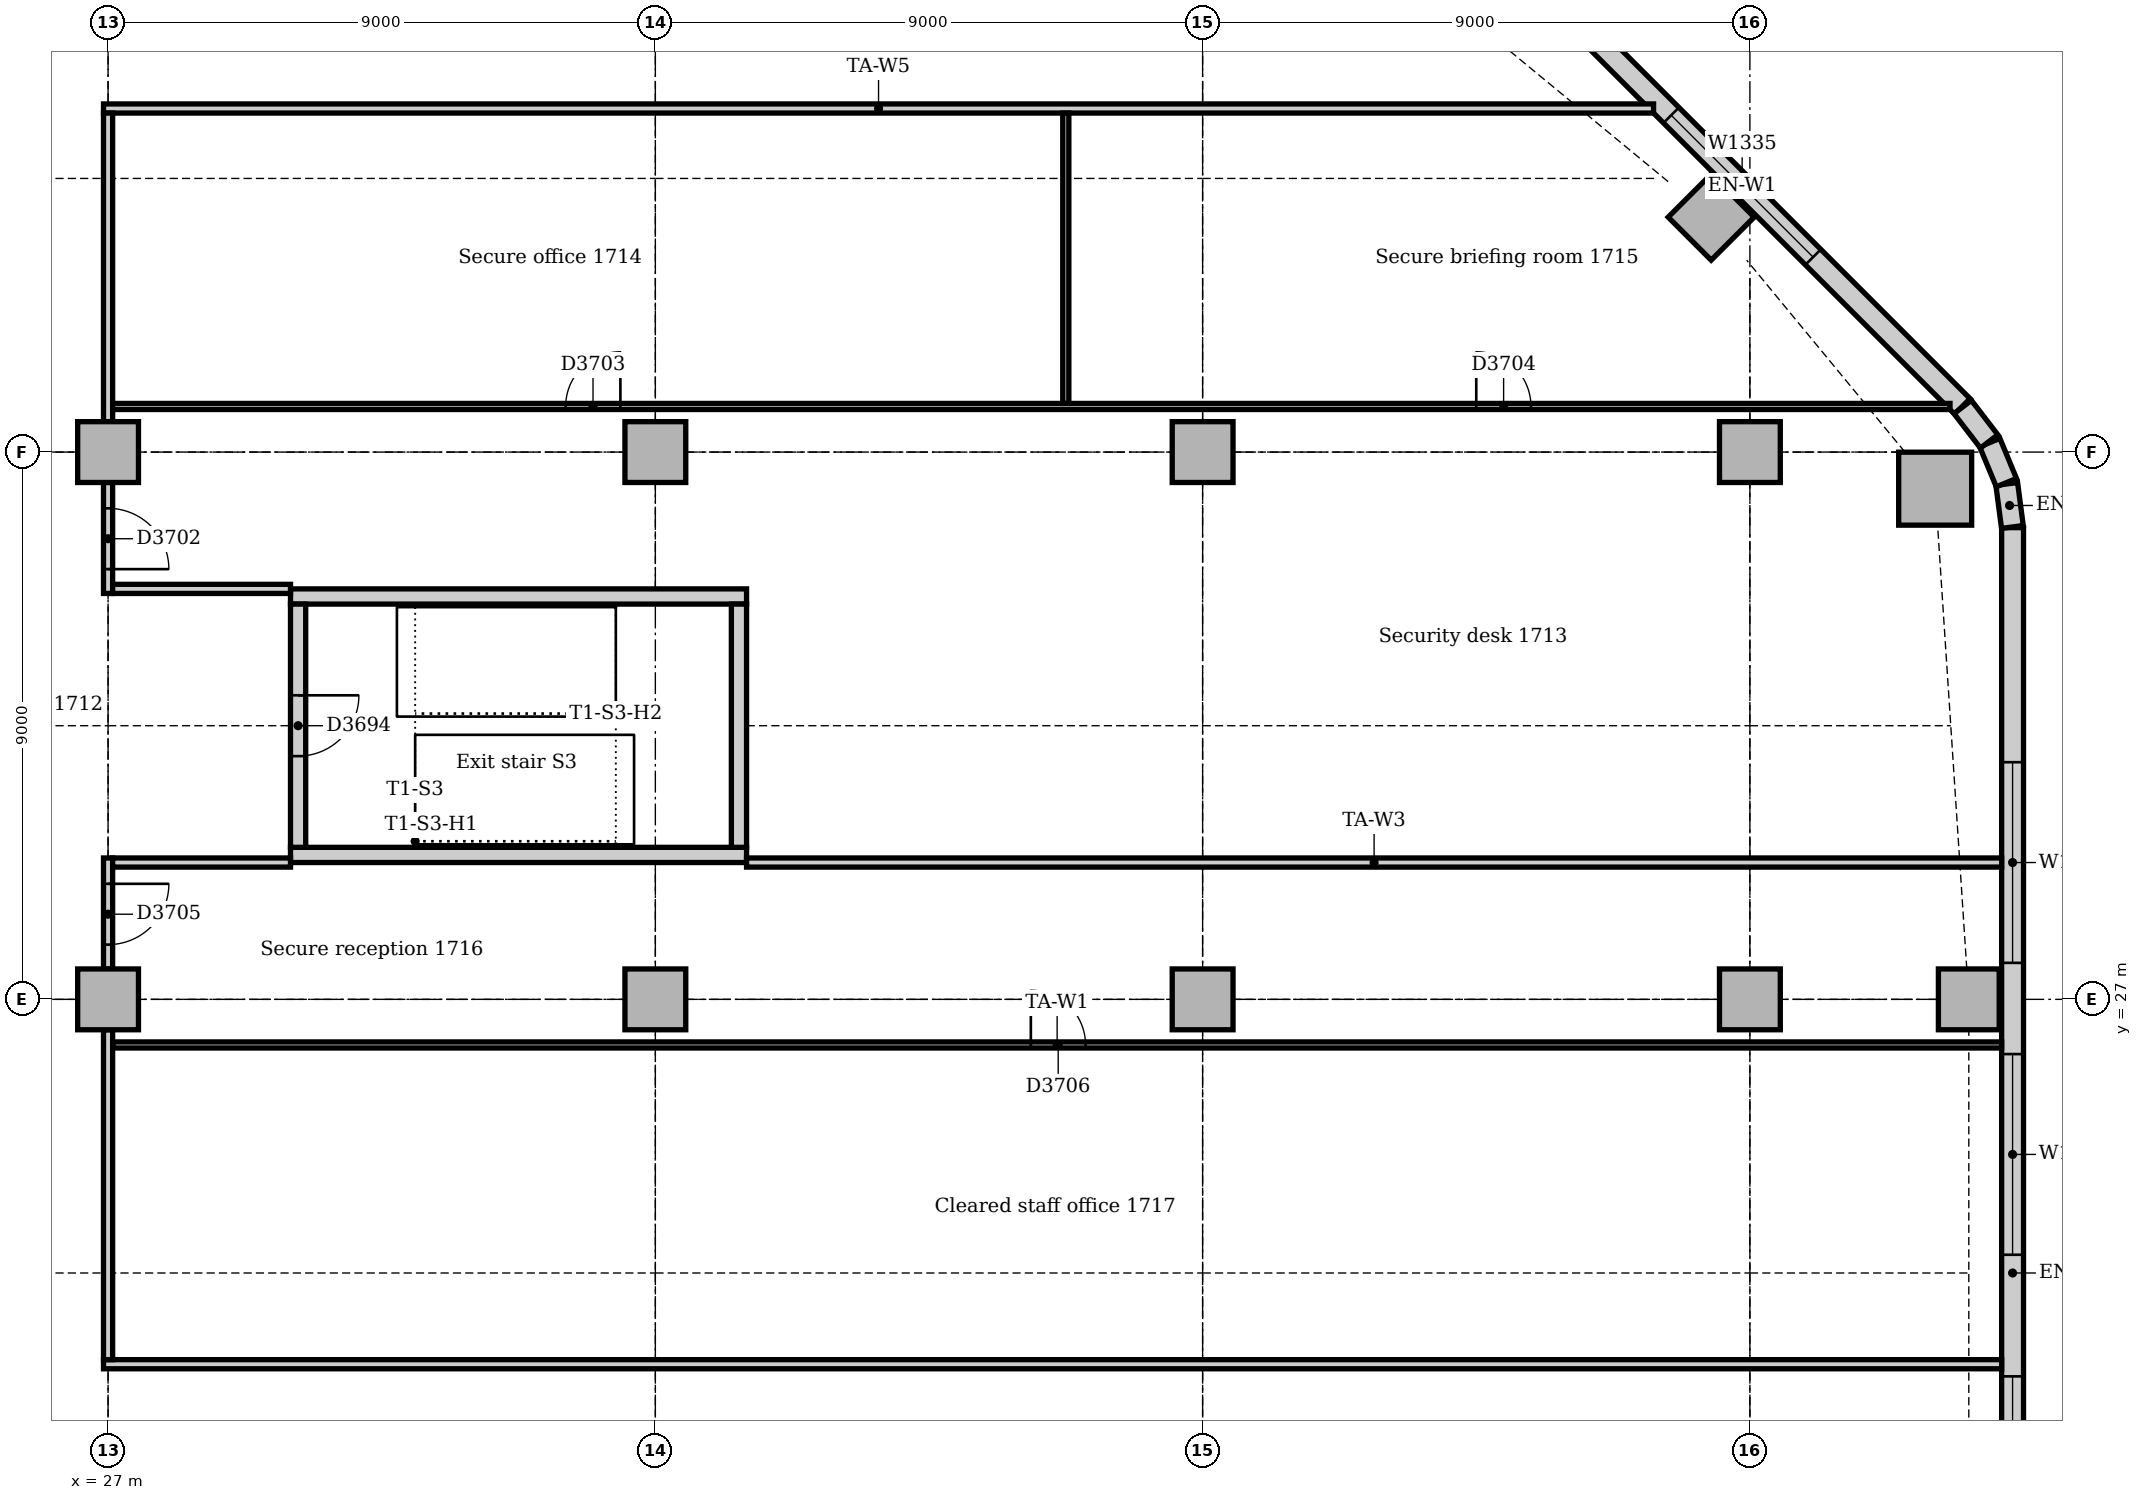
"""IFC4 building model, lengths in metres.
Left out: names, types, materials, properties, quantities, classifications, styles, units other than length and angle.
Written with IfcOpenShell. Run it as: python <this file> out.ifc"""

import sys

from ifc_helpers import new_model, si_unit, direction, frame, frame_2d, origin, origin_2d, place, context, subcontext, project, spatial, rectangle, extrude, element, fill, save


model = new_model("IFC4")
c1 = context("Model", 3, precision=1e-05, world=origin(), true_north=direction((0.0, 1.0)))
c2 = subcontext(c1, "Body", "Model", "MODEL_VIEW")
j1 = project(units=[si_unit("LENGTHUNIT", "METRE"), si_unit("PLANEANGLEUNIT", "RADIAN")], contexts=[c1])
p1 = place(None, origin())
s1 = spatial("IfcSite", under=j1, at=p1, CompositionType="ELEMENT")
p2 = place(p1, origin())
s2 = spatial("IfcBuilding", under=s1, at=p2, CompositionType="ELEMENT")
p3 = place(p2, frame((0.0, 0.0, 75.0)))
s3 = spatial("IfcBuildingStorey", under=s2, at=p3, CompositionType="ELEMENT", Elevation=75.0)
for number, where, z_axis, x_axis in (
    (1, (30.0, 29.375, 0.0), (0.0, 0.0, 1.0), (1.0, 0.0, 0.0)),
    (2, (37.5, 33.625, 0.0), (0.0, 0.0, 1.0), (-1.0, 0.0, 0.0)),
):
    element("IfcWall", number, at=place(p3, frame(where, z_axis=z_axis, x_axis=x_axis)), inside=s3, PredefinedType="SOLIDWALL", context=c2, shape_type="SweptSolid", body=[
        extrude(rectangle(XDim=7.5, YDim=0.25, at=frame_2d((3.75, 0.0))), origin(), (0.0, 0.0, 1.0), 4.0),
    ])
p4 = place(p3, frame((37.375, 29.5, 0.0), z_axis=(0.0, 0.0, 1.0), x_axis=(0.0, 1.0, 0.0)))
e3 = element("IfcWall", 3, at=p4, inside=s3, PredefinedType="SOLIDWALL", context=c2, shape_type="SweptSolid", body=[
    extrude(rectangle(XDim=4.0, YDim=0.25, at=frame_2d((2.0, 0.0))), origin(), (0.0, 0.0, 1.0), 4.0),
])
p5 = place(p3, frame((30.125, 33.5, 0.0), z_axis=(0.0, 0.0, 1.0), x_axis=(0.0, -1.0, 0.0)))
e4 = element("IfcWall", 4, at=p5, inside=s3, PredefinedType="SOLIDWALL", context=c2, shape_type="SweptSolid", body=[
    extrude(rectangle(XDim=4.0, YDim=0.25, at=frame_2d((2.0, 0.0))), origin(), (0.0, 0.0, 1.0), 4.0),
])
p6 = place(p5, frame((1.5, 0.0, 0.0)))
e5 = element("IfcOpeningElement", 5, at=p6, cuts=e4, PredefinedType="OPENING", context=c2, shape_type="SweptSolid", body=[
    extrude(rectangle(XDim=1.0, YDim=2.1, at=frame_2d((0.5, 1.05))), frame((0.0, 0.135, 0.0), z_axis=(0.0, -1.0, 0.0), x_axis=(1.0, 0.0, 0.0)), (0.0, 0.0, 1.0), 0.27),
])
p7 = place(p3, frame((57.047, 35.398, 0.0), z_axis=(0.0, 0.0, 1.0), x_axis=(1.0, 0.0, 0.0)))
e6 = element("IfcColumn", 6, at=p7, inside=s3, PredefinedType="COLUMN", context=c2, shape_type="SweptSolid", body=[
    extrude(rectangle(XDim=1.2, YDim=1.2, at=origin_2d()), origin(), (0.0, 0.0, 1.0), 3.85),
])
for number, where, z_axis, x_axis in (
    (7, (57.6, 27.0, 0.0), (0.0, 0.0, 1.0), (1.0, 0.0, 0.0)),
    (8, (53.364, 39.864, 0.0), (0.0, 0.0, 1.0), (0.707, 0.707, 0.0)),
    (9, (27.0, 27.0, 0.0), (0.0, 0.0, 1.0), (1.0, 0.0, 0.0)),
    (10, (27.0, 36.0, 0.0), (0.0, 0.0, 1.0), (1.0, 0.0, 0.0)),
    (11, (36.0, 27.0, 0.0), (0.0, 0.0, 1.0), (1.0, 0.0, 0.0)),
    (12, (36.0, 36.0, 0.0), (0.0, 0.0, 1.0), (1.0, 0.0, 0.0)),
    (13, (45.0, 27.0, 0.0), (0.0, 0.0, 1.0), (1.0, 0.0, 0.0)),
    (14, (45.0, 36.0, 0.0), (0.0, 0.0, 1.0), (1.0, 0.0, 0.0)),
    (15, (54.0, 27.0, 0.0), (0.0, 0.0, 1.0), (1.0, 0.0, 0.0)),
    (16, (54.0, 36.0, 0.0), (0.0, 0.0, 1.0), (1.0, 0.0, 0.0)),
):
    element("IfcColumn", number, at=place(p3, frame(where, z_axis=z_axis, x_axis=x_axis)), inside=s3, PredefinedType="COLUMN", context=c2, shape_type="SweptSolid", body=[
        extrude(rectangle(XDim=1.0, YDim=1.0, at=origin_2d()), origin(), (0.0, 0.0, 1.0), 3.85),
    ])
p8 = place(p3, frame((58.32, 10.243, 0.0), z_axis=(0.0, 0.0, 1.0), x_axis=(0.0, 1.0, 0.0)))
e17 = element("IfcWall", 17, at=p8, inside=s3, PredefinedType="STANDARD", context=c2, shape_type="SweptSolid", body=[
    extrude(rectangle(XDim=24.515, YDim=0.36, at=frame_2d((12.257, 0.0))), origin(), (0.0, 0.0, 1.0), 3.85),
])
p9 = place(p8, frame((3.857, 0.0, 0.9)))
e18 = element("IfcOpeningElement", 18, at=p9, cuts=e17, PredefinedType="OPENING", context=c2, shape_type="SweptSolid", body=[
    extrude(rectangle(XDim=3.3, YDim=1.6, at=frame_2d((1.65, 0.8))), frame((0.0, 0.19, 0.0), z_axis=(0.0, -1.0, 0.0), x_axis=(1.0, 0.0, 0.0)), (0.0, 0.0, 1.0), 0.38),
])
p10 = place(p8, frame((8.757, 0.0, 0.9)))
e19 = element("IfcOpeningElement", 19, at=p10, cuts=e17, PredefinedType="OPENING", context=c2, shape_type="SweptSolid", body=[
    extrude(rectangle(XDim=1.8, YDim=1.6, at=frame_2d((0.9, 0.8))), frame((0.0, 0.19, 0.0), z_axis=(0.0, -1.0, 0.0), x_axis=(1.0, 0.0, 0.0)), (0.0, 0.0, 1.0), 0.38),
])
p11 = place(p8, frame((12.557, 0.0, 0.9)))
e20 = element("IfcOpeningElement", 20, at=p11, cuts=e17, PredefinedType="OPENING", context=c2, shape_type="SweptSolid", body=[
    extrude(rectangle(XDim=3.3, YDim=1.6, at=frame_2d((1.65, 0.8))), frame((0.0, 0.19, 0.0), z_axis=(0.0, -1.0, 0.0), x_axis=(1.0, 0.0, 0.0)), (0.0, 0.0, 1.0), 0.38),
])
p12 = place(p8, frame((17.357, 0.0, 0.9)))
e21 = element("IfcOpeningElement", 21, at=p12, cuts=e17, PredefinedType="OPENING", context=c2, shape_type="SweptSolid", body=[
    extrude(rectangle(XDim=3.3, YDim=1.6, at=frame_2d((1.65, 0.8))), frame((0.0, 0.19, 0.0), z_axis=(0.0, -1.0, 0.0), x_axis=(1.0, 0.0, 0.0)), (0.0, 0.0, 1.0), 0.38),
])
p13 = place(p3, frame((57.494, 36.751, 0.0), z_axis=(0.0, 0.0, 1.0), x_axis=(-0.707106781187, 0.707106781187, 0.0)))
e22 = element("IfcWall", 22, at=p13, inside=s3, PredefinedType="STANDARD", context=c2, shape_type="SweptSolid", body=[
    extrude(rectangle(XDim=10.243, YDim=0.36, at=frame_2d((5.121, 0.0))), origin(), (0.0, 0.0, 1.0), 3.85),
])
p14 = place(p13, frame((3.471, 0.0, 0.9)))
e23 = element("IfcOpeningElement", 23, at=p14, cuts=e22, PredefinedType="OPENING", context=c2, shape_type="SweptSolid", body=[
    extrude(rectangle(XDim=3.3, YDim=1.6, at=frame_2d((1.65, 0.8))), frame((0.0, 0.19, 0.0), z_axis=(0.0, -1.0, 0.0), x_axis=(1.0, 0.0, 0.0)), (0.0, 0.0, 1.0), 0.38),
])
for number, where, z_axis, x_axis in (
    (24, (58.317, 34.769, 0.0), (0.0, 0.0, 1.0), (-0.131, 0.991, 0.0)),
    (25, (58.218, 35.497, 0.0), (0.0, 0.0, 1.0), (-0.383, 0.924, 0.0)),
):
    element("IfcWall", number, at=place(p3, frame(where, z_axis=z_axis, x_axis=x_axis)), inside=s3, PredefinedType="STANDARD", context=c2, shape_type="SweptSolid", body=[
        extrude(rectangle(XDim=0.713, YDim=0.36, at=frame_2d((0.356, 0.0))), origin(), (0.0, 0.0, 1.0), 3.85),
    ])
p15 = place(p3, frame((57.934, 36.175, 0.0), z_axis=(0.0, 0.0, 1.0), x_axis=(-0.608802368033, 0.793321924995, 0.0)))
e26 = element("IfcWall", 26, at=p15, inside=s3, PredefinedType="STANDARD", context=c2, shape_type="SweptSolid", body=[
    extrude(rectangle(XDim=0.713, YDim=0.36, at=frame_2d((0.357, 0.0))), origin(), (0.0, 0.0, 1.0), 3.85),
])
p16 = place(p3, frame((26.925, 21.0, 0.0), z_axis=(0.0, 0.0, 1.0), x_axis=(1.0, 0.0, 0.0)))
e27 = element("IfcWall", 27, at=p16, inside=s3, PredefinedType="PARTITIONING", context=c2, shape_type="SweptSolid", body=[
    extrude(rectangle(XDim=31.215, YDim=0.15, at=frame_2d((15.607, 0.0))), origin(), (0.0, 0.0, 1.0), 3.85),
])
p17 = place(p3, frame((26.925, 41.65, 0.0), z_axis=(0.0, 0.0, 1.0), x_axis=(1.0, 0.0, 0.0)))
e28 = element("IfcWall", 28, at=p17, inside=s3, PredefinedType="PARTITIONING", context=c2, shape_type="SweptSolid", body=[
    extrude(rectangle(XDim=25.491, YDim=0.15, at=frame_2d((12.745, 0.0))), origin(), (0.0, 0.0, 1.0), 3.85),
])
p18 = place(p3, frame((27.0, 21.075, 0.0), z_axis=(0.0, 0.0, 1.0), x_axis=(0.0, 1.0, 0.0)))
e29 = element("IfcWall", 29, at=p18, inside=s3, PredefinedType="PARTITIONING", context=c2, shape_type="SweptSolid", body=[
    extrude(rectangle(XDim=5.425, YDim=0.15, at=frame_2d((2.712, 0.0))), origin(), (0.0, 0.0, 1.0), 3.158),
])
p19 = place(p3, frame((27.0, 27.5, 0.0), z_axis=(0.0, 0.0, 1.0), x_axis=(0.0, 1.0, 0.0)))
e30 = element("IfcWall", 30, at=p19, inside=s3, PredefinedType="PARTITIONING", context=c2, shape_type="SweptSolid", body=[
    extrude(rectangle(XDim=1.825, YDim=0.15, at=frame_2d((0.912, 0.0))), origin(), (0.0, 0.0, 1.0), 3.158),
])
p20 = place(p19, frame((0.4, 0.0, 0.0)))
e31 = element("IfcOpeningElement", 31, at=p20, cuts=e30, PredefinedType="OPENING", context=c2, shape_type="SweptSolid", body=[
    extrude(rectangle(XDim=1.0, YDim=2.1, at=frame_2d((0.5, 1.05))), frame((0.0, 0.085, 0.0), z_axis=(0.0, -1.0, 0.0), x_axis=(1.0, 0.0, 0.0)), (0.0, 0.0, 1.0), 0.17),
])
p21 = place(p3, frame((27.0, 33.675, 0.0), z_axis=(0.0, 0.0, 1.0), x_axis=(0.0, 1.0, 0.0)))
e32 = element("IfcWall", 32, at=p21, inside=s3, PredefinedType="PARTITIONING", context=c2, shape_type="SweptSolid", body=[
    extrude(rectangle(XDim=1.825, YDim=0.15, at=frame_2d((0.912, 0.0))), origin(), (0.0, 0.0, 1.0), 3.158),
])
p22 = place(p21, frame((0.4, 0.0, 0.0)))
e33 = element("IfcOpeningElement", 33, at=p22, cuts=e32, PredefinedType="OPENING", context=c2, shape_type="SweptSolid", body=[
    extrude(rectangle(XDim=1.0, YDim=2.1, at=frame_2d((0.5, 1.05))), frame((0.0, 0.085, 0.0), z_axis=(0.0, -1.0, 0.0), x_axis=(1.0, 0.0, 0.0)), (0.0, 0.0, 1.0), 0.17),
])
p23 = place(p3, frame((27.0, 36.5, 0.0), z_axis=(0.0, 0.0, 1.0), x_axis=(0.0, 1.0, 0.0)))
e34 = element("IfcWall", 34, at=p23, inside=s3, PredefinedType="PARTITIONING", context=c2, shape_type="SweptSolid", body=[
    extrude(rectangle(XDim=5.075, YDim=0.15, at=frame_2d((2.538, 0.0))), origin(), (0.0, 0.0, 1.0), 3.158),
])
for number, where, z_axis, x_axis in (
    (35, (27.075, 29.25, 0.0), (0.0, 0.0, 1.0), (1.0, 0.0, 0.0)),
    (36, (27.075, 33.75, 0.0), (0.0, 0.0, 1.0), (1.0, 0.0, 0.0)),
):
    element("IfcWall", number, at=place(p3, frame(where, z_axis=z_axis, x_axis=x_axis)), inside=s3, PredefinedType="PARTITIONING", context=c2, shape_type="SweptSolid", body=[
        extrude(rectangle(XDim=2.925, YDim=0.15, at=frame_2d((1.462, 0.0))), origin(), (0.0, 0.0, 1.0), 3.85),
    ])
p24 = place(p3, frame((37.5, 29.25, 0.0), z_axis=(0.0, 0.0, 1.0), x_axis=(1.0, 0.0, 0.0)))
e37 = element("IfcWall", 37, at=p24, inside=s3, PredefinedType="PARTITIONING", context=c2, shape_type="SweptSolid", body=[
    extrude(rectangle(XDim=20.64, YDim=0.15, at=frame_2d((10.32, 0.0))), origin(), (0.0, 0.0, 1.0), 3.85),
])
p25 = place(p3, frame((27.075, 26.25, 0.0), z_axis=(0.0, 0.0, 1.0), x_axis=(1.0, 0.0, 0.0)))
e38 = element("IfcWall", 38, at=p25, inside=s3, PredefinedType="PARTITIONING", context=c2, shape_type="SweptSolid", body=[
    extrude(rectangle(XDim=31.065, YDim=0.1, at=frame_2d((15.533, 0.0))), origin(), (0.0, 0.0, 1.0), 3.85),
])
p26 = place(p25, frame((15.1, 0.0, 0.0)))
e39 = element("IfcOpeningElement", 39, at=p26, cuts=e38, PredefinedType="OPENING", context=c2, shape_type="SweptSolid", body=[
    extrude(rectangle(XDim=0.9, YDim=2.1, at=frame_2d((0.45, 1.05))), frame((0.0, 0.06, 0.0), z_axis=(0.0, -1.0, 0.0), x_axis=(1.0, 0.0, 0.0)), (0.0, 0.0, 1.0), 0.12),
])
p27 = place(p3, frame((27.075, 36.75, 0.0), z_axis=(0.0, 0.0, 1.0), x_axis=(1.0, 0.0, 0.0)))
e40 = element("IfcWall", 40, at=p27, inside=s3, PredefinedType="PARTITIONING", context=c2, shape_type="SweptSolid", body=[
    extrude(rectangle(XDim=30.216, YDim=0.1, at=frame_2d((15.108, 0.0))), origin(), (0.0, 0.0, 1.0), 3.85),
])
p28 = place(p27, frame((7.45, 0.0, 0.0)))
e41 = element("IfcOpeningElement", 41, at=p28, cuts=e40, PredefinedType="OPENING", context=c2, shape_type="SweptSolid", body=[
    extrude(rectangle(XDim=0.9, YDim=2.1, at=frame_2d((0.45, 1.05))), frame((0.0, 0.06, 0.0), z_axis=(0.0, -1.0, 0.0), x_axis=(1.0, 0.0, 0.0)), (0.0, 0.0, 1.0), 0.12),
])
p29 = place(p27, frame((22.425, 0.0, 0.0)))
e42 = element("IfcOpeningElement", 42, at=p29, cuts=e40, PredefinedType="OPENING", context=c2, shape_type="SweptSolid", body=[
    extrude(rectangle(XDim=0.9, YDim=2.1, at=frame_2d((0.45, 1.05))), frame((0.0, 0.06, 0.0), z_axis=(0.0, -1.0, 0.0), x_axis=(1.0, 0.0, 0.0)), (0.0, 0.0, 1.0), 0.12),
])
p30 = place(p3, frame((42.75, 36.8, 0.0), z_axis=(0.0, 0.0, 1.0), x_axis=(0.0, 1.0, 0.0)))
e43 = element("IfcWall", 43, at=p30, inside=s3, PredefinedType="PARTITIONING", context=c2, shape_type="SweptSolid", body=[
    extrude(rectangle(XDim=4.775, YDim=0.1, at=frame_2d((2.388, 0.0))), origin(), (0.0, 0.0, 1.0), 3.85),
])
p31 = place(p10, origin())
e44 = element("IfcWindow", 44, at=p31, inside=s3, PartitioningType="SINGLE_PANEL", PredefinedType="WINDOW", context=c2, shape_type="SweptSolid", body=[
    extrude(rectangle(XDim=1.8, YDim=1.6, at=frame_2d((0.9, 0.8))), frame((0.0, 0.13, 0.0), z_axis=(0.0, -1.0, 0.0), x_axis=(1.0, 0.0, 0.0)), (0.0, 0.0, 1.0), 0.06),
])
fill(e19, e44)
p32 = place(p11, origin())
e45 = element("IfcWindow", 45, at=p32, inside=s3, PartitioningType="SINGLE_PANEL", PredefinedType="WINDOW", context=c2, shape_type="SweptSolid", body=[
    extrude(rectangle(XDim=3.3, YDim=1.6, at=frame_2d((1.65, 0.8))), frame((0.0, 0.13, 0.0), z_axis=(0.0, -1.0, 0.0), x_axis=(1.0, 0.0, 0.0)), (0.0, 0.0, 1.0), 0.06),
])
fill(e20, e45)
p33 = place(p12, origin())
e46 = element("IfcWindow", 46, at=p33, inside=s3, PartitioningType="SINGLE_PANEL", PredefinedType="WINDOW", context=c2, shape_type="SweptSolid", body=[
    extrude(rectangle(XDim=3.3, YDim=1.6, at=frame_2d((1.65, 0.8))), frame((0.0, 0.13, 0.0), z_axis=(0.0, -1.0, 0.0), x_axis=(1.0, 0.0, 0.0)), (0.0, 0.0, 1.0), 0.06),
])
fill(e21, e46)
p34 = place(p14, origin())
e47 = element("IfcWindow", 47, at=p34, inside=s3, PartitioningType="SINGLE_PANEL", PredefinedType="WINDOW", context=c2, shape_type="SweptSolid", body=[
    extrude(rectangle(XDim=3.3, YDim=1.6, at=frame_2d((1.65, 0.8))), frame((0.0, 0.13, 0.0), z_axis=(0.0, -1.0, 0.0), x_axis=(1.0, 0.0, 0.0)), (0.0, 0.0, 1.0), 0.06),
])
fill(e23, e47)
p35 = place(p6, origin())
e48 = element("IfcDoor", 48, at=p35, inside=s3, OperationType="SINGLE_SWING_LEFT", PredefinedType="DOOR", context=c2, shape_type="SweptSolid", body=[
    extrude(rectangle(XDim=1.0, YDim=2.1, at=frame_2d((0.5, 1.05))), frame((0.0, 0.025, 0.0), z_axis=(0.0, -1.0, 0.0), x_axis=(1.0, 0.0, 0.0)), (0.0, 0.0, 1.0), 0.05),
])
fill(e5, e48)
p36 = place(p22, frame((1.0, 0.0, 0.0), z_axis=(0.0, 0.0, 1.0), x_axis=(-1.0, 0.0, 0.0)))
e49 = element("IfcDoor", 49, at=p36, inside=s3, OperationType="SINGLE_SWING_RIGHT", PredefinedType="DOOR", context=c2, shape_type="SweptSolid", body=[
    extrude(rectangle(XDim=1.0, YDim=2.1, at=frame_2d((0.5, 1.05))), frame((0.0, 0.025, 0.0), z_axis=(0.0, -1.0, 0.0), x_axis=(1.0, 0.0, 0.0)), (0.0, 0.0, 1.0), 0.05),
])
fill(e33, e49)
p37 = place(p28, origin())
e50 = element("IfcDoor", 50, at=p37, inside=s3, OperationType="SINGLE_SWING_RIGHT", PredefinedType="DOOR", context=c2, shape_type="SweptSolid", body=[
    extrude(rectangle(XDim=0.9, YDim=2.1, at=frame_2d((0.45, 1.05))), frame((0.0, 0.025, 0.0), z_axis=(0.0, -1.0, 0.0), x_axis=(1.0, 0.0, 0.0)), (0.0, 0.0, 1.0), 0.05),
])
fill(e41, e50)
p38 = place(p29, origin())
e51 = element("IfcDoor", 51, at=p38, inside=s3, OperationType="SINGLE_SWING_LEFT", PredefinedType="DOOR", context=c2, shape_type="SweptSolid", body=[
    extrude(rectangle(XDim=0.9, YDim=2.1, at=frame_2d((0.45, 1.05))), frame((0.0, 0.025, 0.0), z_axis=(0.0, -1.0, 0.0), x_axis=(1.0, 0.0, 0.0)), (0.0, 0.0, 1.0), 0.05),
])
fill(e42, e51)
p39 = place(p20, frame((1.0, 0.0, 0.0), z_axis=(0.0, 0.0, 1.0), x_axis=(-1.0, 0.0, 0.0)))
e52 = element("IfcDoor", 52, at=p39, inside=s3, OperationType="SINGLE_SWING_LEFT", PredefinedType="DOOR", context=c2, shape_type="SweptSolid", body=[
    extrude(rectangle(XDim=1.0, YDim=2.1, at=frame_2d((0.5, 1.05))), frame((0.0, 0.025, 0.0), z_axis=(0.0, -1.0, 0.0), x_axis=(1.0, 0.0, 0.0)), (0.0, 0.0, 1.0), 0.05),
])
fill(e31, e52)
p40 = place(p26, origin())
e53 = element("IfcDoor", 53, at=p40, inside=s3, OperationType="SINGLE_SWING_LEFT", PredefinedType="DOOR", context=c2, shape_type="SweptSolid", body=[
    extrude(rectangle(XDim=0.9, YDim=2.1, at=frame_2d((0.45, 1.05))), frame((0.0, 0.025, 0.0), z_axis=(0.0, -1.0, 0.0), x_axis=(1.0, 0.0, 0.0)), (0.0, 0.0, 1.0), 0.05),
])
fill(e39, e53)
save(model, sys.argv[1])
